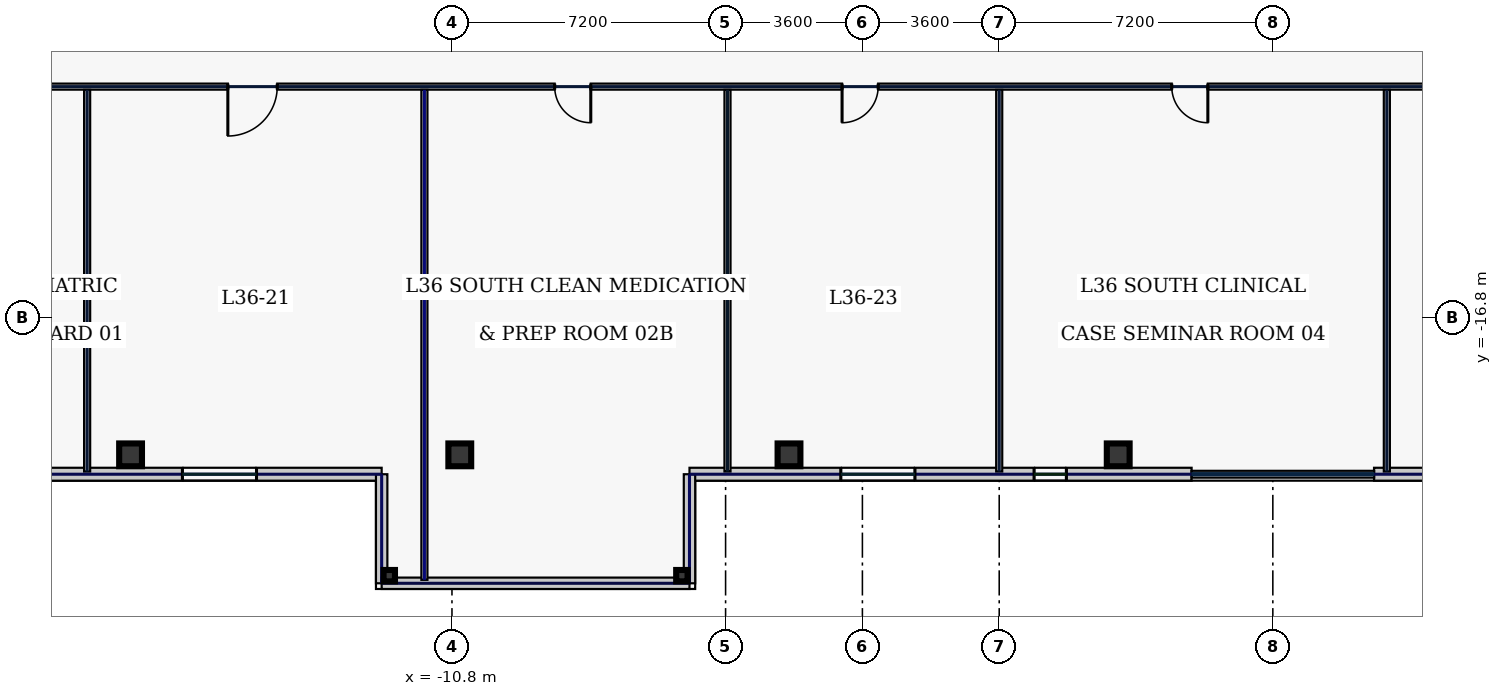
"""IFC4 building model, lengths in metres.
Left out: names, types, materials, properties, quantities, classifications, styles, units other than length and angle.
Written with IfcOpenShell. Run it as: python <this file> out.ifc"""

import sys

from ifc_helpers import new_model, si_unit, direction, frame, frame_2d, origin, origin_2d, place, context, subcontext, project, spatial, rectangle, hollow_rectangle, extrude, element, fill, save


model = new_model("IFC4")
c1 = context("Model", 3, precision=1e-05, world=origin(), true_north=direction((0.0, 1.0)))
c2 = subcontext(c1, "Body", "Model", "MODEL_VIEW")
j1 = project(units=[si_unit("LENGTHUNIT", "METRE"), si_unit("PLANEANGLEUNIT", "RADIAN")], contexts=[c1])
p1 = place(None, origin())
s1 = spatial("IfcSite", under=j1, at=p1, CompositionType="ELEMENT")
p2 = place(p1, origin())
s2 = spatial("IfcBuilding", under=s1, at=p2, CompositionType="ELEMENT")
p3 = place(p2, frame((0.0, 0.0, 160.2)))
s3 = spatial("IfcBuildingStorey", under=s2, at=p3, CompositionType="ELEMENT", Elevation=160.2)
for number, where, z_axis, x_axis in (
    (1, (-19.257, -20.42, 0.0), (0.0, 0.0, 1.0), (1.0, 0.0, 0.0)),
    (2, (-10.594, -20.42, 0.0), (0.0, 0.0, 1.0), (1.0, 0.0, 0.0)),
    (3, (-1.931, -20.42, 0.0), (0.0, 0.0, 1.0), (1.0, 0.0, 0.0)),
    (4, (6.731, -20.42, 0.0), (0.0, 0.0, 1.0), (1.0, 0.0, 0.0)),
):
    element("IfcColumn", number, at=place(p3, frame(where, z_axis=z_axis, x_axis=x_axis)), inside=s3, PredefinedType="COLUMN", context=c2, shape_type="SweptSolid", body=[
        extrude(hollow_rectangle(XDim=0.6, YDim=0.6, WallThickness=0.028, at=origin_2d()), origin(), (0.0, 0.0, 1.0), 3.74),
    ])
for number, where, z_axis, x_axis in (
    (5, (-12.45, -23.6, 0.0), (0.0, 0.0, 1.0), (1.0, 0.0, 0.0)),
    (6, (-4.75, -23.6, 0.0), (0.0, 0.0, 1.0), (1.0, 0.0, 0.0)),
):
    element("IfcColumn", number, at=place(p3, frame(where, z_axis=z_axis, x_axis=x_axis)), inside=s3, PredefinedType="COLUMN", context=c2, shape_type="SweptSolid", body=[
        extrude(hollow_rectangle(XDim=0.3, YDim=0.3, WallThickness=0.016, at=origin_2d()), origin(), (0.0, 0.0, 1.0), 3.74),
    ])
p4 = place(p3, frame((-28.6, -20.93, 0.0), z_axis=(0.0, 0.0, 1.0), x_axis=(1.0, 0.0, 0.0)))
e7 = element("IfcWall", 7, at=p4, inside=s3, PredefinedType="STANDARD", context=c2, shape_type="SweptSolid", body=[
    extrude(rectangle(XDim=15.95, YDim=0.34, at=frame_2d((7.975, 0.0))), origin(), (0.0, 0.0, 1.0), 3.74),
])
p5 = place(p4, frame((2.044, 0.0, 0.8)))
e8 = element("IfcOpeningElement", 8, at=p5, cuts=e7, PredefinedType="OPENING", context=c2, shape_type="SweptSolid", body=[
    extrude(rectangle(XDim=0.85, YDim=1.85, at=frame_2d((0.425, 0.925))), frame((0.0, 0.18, 0.0), z_axis=(0.0, -1.0, 0.0), x_axis=(1.0, 0.0, 0.0)), (0.0, 0.0, 1.0), 0.36),
])
p6 = place(p4, frame((6.029, 0.0, 0.8)))
e9 = element("IfcOpeningElement", 9, at=p6, cuts=e7, PredefinedType="OPENING", context=c2, shape_type="SweptSolid", body=[
    extrude(rectangle(XDim=0.85, YDim=1.85, at=frame_2d((0.425, 0.925))), frame((0.0, 0.18, 0.0), z_axis=(0.0, -1.0, 0.0), x_axis=(1.0, 0.0, 0.0)), (0.0, 0.0, 1.0), 0.36),
])
p7 = place(p4, frame((10.707, 0.0, 0.8)))
e10 = element("IfcOpeningElement", 10, at=p7, cuts=e7, PredefinedType="OPENING", context=c2, shape_type="SweptSolid", body=[
    extrude(rectangle(XDim=1.95, YDim=2.1, at=frame_2d((0.975, 1.05))), frame((0.0, 0.18, 0.0), z_axis=(0.0, -1.0, 0.0), x_axis=(1.0, 0.0, 0.0)), (0.0, 0.0, 1.0), 0.36),
])
p8 = place(p3, frame((-4.55, -20.93, 0.0), z_axis=(0.0, 0.0, 1.0), x_axis=(1.0, 0.0, 0.0)))
e11 = element("IfcWall", 11, at=p8, inside=s3, PredefinedType="STANDARD", context=c2, shape_type="SweptSolid", body=[
    extrude(rectangle(XDim=13.213, YDim=0.34, at=frame_2d((6.606, 0.0))), origin(), (0.0, 0.0, 1.0), 3.74),
])
p9 = place(p8, frame((3.983, 0.0, 0.8)))
e12 = element("IfcOpeningElement", 12, at=p9, cuts=e11, PredefinedType="OPENING", context=c2, shape_type="SweptSolid", body=[
    extrude(rectangle(XDim=1.95, YDim=2.1, at=frame_2d((0.975, 1.05))), frame((0.0, 0.18, 0.0), z_axis=(0.0, -1.0, 0.0), x_axis=(1.0, 0.0, 0.0)), (0.0, 0.0, 1.0), 0.36),
])
p10 = place(p8, frame((9.067, 0.0, 0.8)))
e13 = element("IfcOpeningElement", 13, at=p10, cuts=e11, PredefinedType="OPENING", context=c2, shape_type="SweptSolid", body=[
    extrude(rectangle(XDim=0.85, YDim=1.85, at=frame_2d((0.425, 0.925))), frame((0.0, 0.18, 0.0), z_axis=(0.0, -1.0, 0.0), x_axis=(1.0, 0.0, 0.0)), (0.0, 0.0, 1.0), 0.36),
])
p11 = place(p3, frame((13.463, -20.93, 0.0), z_axis=(0.0, 0.0, 1.0), x_axis=(1.0, 0.0, 0.0)))
e14 = element("IfcWall", 14, at=p11, inside=s3, PredefinedType="STANDARD", context=c2, shape_type="SweptSolid", body=[
    extrude(rectangle(XDim=19.937, YDim=0.34, at=frame_2d((9.969, 0.0))), origin(), (0.0, 0.0, 1.0), 3.74),
])
p12 = place(p11, frame((3.295, 0.0, 0.8)))
e15 = element("IfcOpeningElement", 15, at=p12, cuts=e14, PredefinedType="OPENING", context=c2, shape_type="SweptSolid", body=[
    extrude(rectangle(XDim=1.95, YDim=2.1, at=frame_2d((0.975, 1.05))), frame((0.0, 0.18, 0.0), z_axis=(0.0, -1.0, 0.0), x_axis=(1.0, 0.0, 0.0)), (0.0, 0.0, 1.0), 0.36),
])
p13 = place(p11, frame((8.38, 0.0, 0.8)))
e16 = element("IfcOpeningElement", 16, at=p13, cuts=e14, PredefinedType="OPENING", context=c2, shape_type="SweptSolid", body=[
    extrude(rectangle(XDim=0.85, YDim=1.85, at=frame_2d((0.425, 0.925))), frame((0.0, 0.18, 0.0), z_axis=(0.0, -1.0, 0.0), x_axis=(1.0, 0.0, 0.0)), (0.0, 0.0, 1.0), 0.36),
])
p14 = place(p11, frame((13.058, 0.0, 0.8)))
e17 = element("IfcOpeningElement", 17, at=p14, cuts=e14, PredefinedType="OPENING", context=c2, shape_type="SweptSolid", body=[
    extrude(rectangle(XDim=0.85, YDim=1.85, at=frame_2d((0.425, 0.925))), frame((0.0, 0.18, 0.0), z_axis=(0.0, -1.0, 0.0), x_axis=(1.0, 0.0, 0.0)), (0.0, 0.0, 1.0), 0.36),
])
p15 = place(p11, frame((15.943, 0.0, 0.8)))
e18 = element("IfcOpeningElement", 18, at=p15, cuts=e14, PredefinedType="OPENING", context=c2, shape_type="SweptSolid", body=[
    extrude(rectangle(XDim=1.95, YDim=2.1, at=frame_2d((0.975, 1.05))), frame((0.0, 0.18, 0.0), z_axis=(0.0, -1.0, 0.0), x_axis=(1.0, 0.0, 0.0)), (0.0, 0.0, 1.0), 0.36),
])
for number, where, z_axis, x_axis in (
    (19, (-12.65, -20.93, 0.0), (0.0, 0.0, 1.0), (0.0, -1.0, 0.0)),
    (20, (-4.55, -20.93, 0.0), (0.0, 0.0, 1.0), (0.0, -1.0, 0.0)),
):
    element("IfcWall", number, at=place(p3, frame(where, z_axis=z_axis, x_axis=x_axis)), inside=s3, PredefinedType="STANDARD", context=c2, shape_type="SweptSolid", body=[
        extrude(rectangle(XDim=2.87, YDim=0.3, at=frame_2d((1.435, 0.0))), origin(), (0.0, 0.0, 1.0), 1.535),
    ])
p16 = place(p3, frame((-12.65, -23.8, 0.0), z_axis=(0.0, 0.0, 1.0), x_axis=(1.0, 0.0, 0.0)))
e21 = element("IfcWall", 21, at=p16, inside=s3, PredefinedType="STANDARD", context=c2, shape_type="SweptSolid", body=[
    extrude(rectangle(XDim=8.1, YDim=0.3, at=frame_2d((4.05, 0.0))), origin(), (0.0, 0.0, 1.0), 2.135),
])
p17 = place(p3, frame((24.965, -10.73, 0.0), z_axis=(0.0, 0.0, 1.0), x_axis=(-1.0, 0.0, 0.0)))
e22 = element("IfcWall", 22, at=p17, inside=s3, PredefinedType="PARTITIONING", context=c2, shape_type="SweptSolid", body=[
    extrude(rectangle(XDim=49.93, YDim=0.16, at=frame_2d((24.965, 0.0))), origin(), (0.0, 0.0, 1.0), 3.74),
])
p18 = place(p17, frame((46.931, 0.0, 0.0)))
e23 = element("IfcOpeningElement", 23, at=p18, cuts=e22, PredefinedType="OPENING", context=c2, shape_type="SweptSolid", body=[
    extrude(rectangle(XDim=1.3, YDim=2.2, at=frame_2d((0.65, 1.1))), frame((0.0, 0.09, 0.0), z_axis=(0.0, -1.0, 0.0), x_axis=(1.0, 0.0, 0.0)), (0.0, 0.0, 1.0), 0.18),
])
p19 = place(p17, frame((40.363, 0.0, 0.0)))
e24 = element("IfcOpeningElement", 24, at=p19, cuts=e22, PredefinedType="OPENING", context=c2, shape_type="SweptSolid", body=[
    extrude(rectangle(XDim=1.3, YDim=2.2, at=frame_2d((0.65, 1.1))), frame((0.0, 0.09, 0.0), z_axis=(0.0, -1.0, 0.0), x_axis=(1.0, 0.0, 0.0)), (0.0, 0.0, 1.0), 0.18),
])
p20 = place(p17, frame((32.113, 0.0, 0.0)))
e25 = element("IfcOpeningElement", 25, at=p20, cuts=e22, PredefinedType="OPENING", context=c2, shape_type="SweptSolid", body=[
    extrude(rectangle(XDim=0.95, YDim=2.2, at=frame_2d((0.475, 1.1))), frame((0.0, 0.09, 0.0), z_axis=(0.0, -1.0, 0.0), x_axis=(1.0, 0.0, 0.0)), (0.0, 0.0, 1.0), 0.18),
])
p21 = place(p17, frame((24.55, 0.0, 0.0)))
e26 = element("IfcOpeningElement", 26, at=p21, cuts=e22, PredefinedType="OPENING", context=c2, shape_type="SweptSolid", body=[
    extrude(rectangle(XDim=0.95, YDim=2.2, at=frame_2d((0.475, 1.1))), frame((0.0, 0.09, 0.0), z_axis=(0.0, -1.0, 0.0), x_axis=(1.0, 0.0, 0.0)), (0.0, 0.0, 1.0), 0.18),
])
p22 = place(p17, frame((15.875, 0.0, 0.0)))
e27 = element("IfcOpeningElement", 27, at=p22, cuts=e22, PredefinedType="OPENING", context=c2, shape_type="SweptSolid", body=[
    extrude(rectangle(XDim=0.95, YDim=2.2, at=frame_2d((0.475, 1.1))), frame((0.0, 0.09, 0.0), z_axis=(0.0, -1.0, 0.0), x_axis=(1.0, 0.0, 0.0)), (0.0, 0.0, 1.0), 0.18),
])
p23 = place(p17, frame((7.475, 0.0, 0.0)))
e28 = element("IfcOpeningElement", 28, at=p23, cuts=e22, PredefinedType="OPENING", context=c2, shape_type="SweptSolid", body=[
    extrude(rectangle(XDim=1.05, YDim=2.2, at=frame_2d((0.525, 1.1))), frame((0.0, 0.09, 0.0), z_axis=(0.0, -1.0, 0.0), x_axis=(1.0, 0.0, 0.0)), (0.0, 0.0, 1.0), 0.18),
])
p24 = place(p17, frame((1.869, 0.0, 0.0)))
e29 = element("IfcOpeningElement", 29, at=p24, cuts=e22, PredefinedType="OPENING", context=c2, shape_type="SweptSolid", body=[
    extrude(rectangle(XDim=1.3, YDim=2.2, at=frame_2d((0.65, 1.1))), frame((0.0, 0.09, 0.0), z_axis=(0.0, -1.0, 0.0), x_axis=(1.0, 0.0, 0.0)), (0.0, 0.0, 1.0), 0.18),
])
p25 = place(p3, frame((-20.4, -20.86, 0.0), z_axis=(0.0, 0.0, 1.0), x_axis=(0.0, 1.0, 0.0)))
e30 = element("IfcWall", 30, at=p25, inside=s3, PredefinedType="PARTITIONING", context=c2, shape_type="SweptSolid", body=[
    extrude(rectangle(XDim=10.045, YDim=0.16, at=frame_2d((5.022, 0.0))), origin(), (0.0, 0.0, 1.0), 3.74),
])
p26 = place(p3, frame((-3.55, -20.86, 0.0), z_axis=(0.0, 0.0, 1.0), x_axis=(0.0, 1.0, 0.0)))
e31 = element("IfcWall", 31, at=p26, inside=s3, PredefinedType="PARTITIONING", context=c2, shape_type="SweptSolid", body=[
    extrude(rectangle(XDim=10.045, YDim=0.16, at=frame_2d((5.022, 0.0))), origin(), (0.0, 0.0, 1.0), 3.285),
])
for number, where, z_axis, x_axis in (
    (32, (3.6, -20.86, 0.0), (0.0, 0.0, 1.0), (0.0, 1.0, 0.0)),
    (33, (13.8, -20.86, 0.0), (0.0, 0.0, 1.0), (0.0, 1.0, 0.0)),
):
    element("IfcWall", number, at=place(p3, frame(where, z_axis=z_axis, x_axis=x_axis)), inside=s3, PredefinedType="PARTITIONING", context=c2, shape_type="SweptSolid", body=[
        extrude(rectangle(XDim=10.045, YDim=0.16, at=frame_2d((5.022, 0.0))), origin(), (0.0, 0.0, 1.0), 3.74),
    ])
p27 = place(p3, frame((-11.525, -23.71, 0.0), z_axis=(0.0, 0.0, 1.0), x_axis=(0.0, 1.0, 0.0)))
e34 = element("IfcWall", 34, at=p27, inside=s3, PredefinedType="PARTITIONING", context=c2, shape_type="SweptSolid", body=[
    extrude(rectangle(XDim=12.895, YDim=0.16, at=frame_2d((6.448, 0.0))), origin(), (0.0, 0.0, 1.0), 1.535),
])
p28 = place(p7, origin())
e35 = element("IfcWindow", 35, at=p28, inside=s3, PartitioningType="SINGLE_PANEL", PredefinedType="WINDOW", context=c2, shape_type="SweptSolid", body=[
    extrude(rectangle(XDim=1.95, YDim=2.1, at=frame_2d((0.975, 1.05))), frame((0.0, 0.03, 0.0), z_axis=(0.0, -1.0, 0.0), x_axis=(1.0, 0.0, 0.0)), (0.0, 0.0, 1.0), 0.06),
])
fill(e10, e35)
p29 = place(p9, origin())
e36 = element("IfcWindow", 36, at=p29, inside=s3, PartitioningType="SINGLE_PANEL", PredefinedType="WINDOW", context=c2, shape_type="SweptSolid", body=[
    extrude(rectangle(XDim=1.95, YDim=2.1, at=frame_2d((0.975, 1.05))), frame((0.0, 0.03, 0.0), z_axis=(0.0, -1.0, 0.0), x_axis=(1.0, 0.0, 0.0)), (0.0, 0.0, 1.0), 0.06),
])
fill(e12, e36)
p30 = place(p10, origin())
e37 = element("IfcWindow", 37, at=p30, inside=s3, PartitioningType="SINGLE_PANEL", PredefinedType="WINDOW", context=c2, shape_type="SweptSolid", body=[
    extrude(rectangle(XDim=0.85, YDim=1.85, at=frame_2d((0.425, 0.925))), frame((0.0, 0.03, 0.0), z_axis=(0.0, -1.0, 0.0), x_axis=(1.0, 0.0, 0.0)), (0.0, 0.0, 1.0), 0.06),
])
fill(e13, e37)
p31 = place(p19, origin())
e38 = element("IfcDoor", 38, at=p31, inside=s3, OperationType="SINGLE_SWING_RIGHT", PredefinedType="DOOR", context=c2, shape_type="SweptSolid", body=[
    extrude(rectangle(XDim=1.3, YDim=2.2, at=frame_2d((0.65, 1.1))), frame((0.0, 0.025, 0.0), z_axis=(0.0, -1.0, 0.0), x_axis=(1.0, 0.0, 0.0)), (0.0, 0.0, 1.0), 0.05),
])
fill(e24, e38)
p32 = place(p20, origin())
e39 = element("IfcDoor", 39, at=p32, inside=s3, OperationType="SINGLE_SWING_LEFT", PredefinedType="DOOR", context=c2, shape_type="SweptSolid", body=[
    extrude(rectangle(XDim=0.95, YDim=2.2, at=frame_2d((0.475, 1.1))), frame((0.0, 0.025, 0.0), z_axis=(0.0, -1.0, 0.0), x_axis=(1.0, 0.0, 0.0)), (0.0, 0.0, 1.0), 0.05),
])
fill(e25, e39)
p33 = place(p21, origin())
e40 = element("IfcDoor", 40, at=p33, inside=s3, OperationType="SINGLE_SWING_RIGHT", PredefinedType="DOOR", context=c2, shape_type="SweptSolid", body=[
    extrude(rectangle(XDim=0.95, YDim=2.2, at=frame_2d((0.475, 1.1))), frame((0.0, 0.025, 0.0), z_axis=(0.0, -1.0, 0.0), x_axis=(1.0, 0.0, 0.0)), (0.0, 0.0, 1.0), 0.05),
])
fill(e26, e40)
p34 = place(p22, origin())
e41 = element("IfcDoor", 41, at=p34, inside=s3, OperationType="SINGLE_SWING_LEFT", PredefinedType="DOOR", context=c2, shape_type="SweptSolid", body=[
    extrude(rectangle(XDim=0.95, YDim=2.2, at=frame_2d((0.475, 1.1))), frame((0.0, 0.025, 0.0), z_axis=(0.0, -1.0, 0.0), x_axis=(1.0, 0.0, 0.0)), (0.0, 0.0, 1.0), 0.05),
])
fill(e27, e41)
save(model, sys.argv[1])
